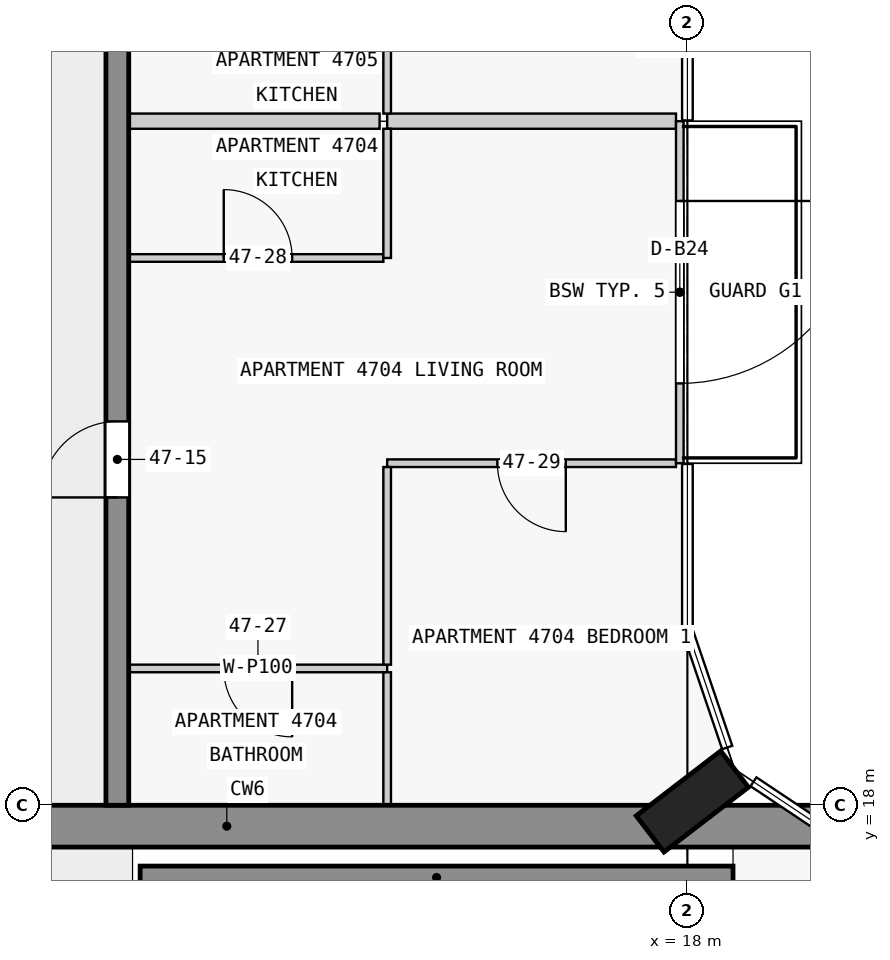
"""IFC4 building model, lengths in metres.
Left out: names, types, materials, properties, quantities, classifications, styles, units other than length and angle.
Written with IfcOpenShell. Run it as: python <this file> out.ifc"""

import sys

from ifc_helpers import new_model, si_unit, direction, frame, frame_2d, origin, origin_2d, place, context, subcontext, project, spatial, rectangle, extrude, element, fill, save


model = new_model("IFC4")
c1 = context("Model", 3, precision=1e-05, world=origin(), true_north=direction((0.0, 1.0)))
c2 = subcontext(c1, "Body", "Model", "MODEL_VIEW")
j1 = project(units=[si_unit("LENGTHUNIT", "METRE"), si_unit("PLANEANGLEUNIT", "RADIAN")], contexts=[c1])
p1 = place(None, origin())
s1 = spatial("IfcSite", under=j1, at=p1, CompositionType="ELEMENT")
p2 = place(p1, origin())
s2 = spatial("IfcBuilding", under=s1, at=p2, CompositionType="ELEMENT")
p3 = place(p2, frame((0.0, 0.0, 181.4)))
s3 = spatial("IfcBuildingStorey", under=s2, at=p3, CompositionType="ELEMENT", Elevation=181.4)
p4 = place(p3, frame((18.065, 18.05, 0.0), z_axis=(0.0, 0.0, 1.0), x_axis=(-0.608810846443, 0.793315418515, 0.0)))
e1 = element("IfcColumn", 1, at=p4, inside=s3, PredefinedType="COLUMN", context=c2, shape_type="SweptSolid", body=[
    extrude(rectangle(XDim=0.6, YDim=1.4, at=origin_2d()), origin(), (0.0, 0.0, 1.0), 3.5),
])
p5 = place(p3, frame((1.38, 17.725, 0.0), z_axis=(0.0, 0.0, 1.0), x_axis=(1.0, 0.0, 0.0)))
e2 = element("IfcWall", 2, at=p5, inside=s3, PredefinedType="SHEAR", context=c2, shape_type="SweptSolid", body=[
    extrude(rectangle(XDim=21.12, YDim=0.55, at=frame_2d((10.56, 0.0))), origin(), (0.0, 0.0, 1.0), 3.2),
])
p6 = place(p5, frame((6.35, 0.0, 0.0)))
e3 = element("IfcOpeningElement", 3, at=p6, cuts=e2, PredefinedType="OPENING", context=c2, shape_type="SweptSolid", body=[
    extrude(rectangle(XDim=1.8, YDim=2.1, at=frame_2d((0.9, 1.05))), frame((0.0, 0.285, 0.0), z_axis=(0.0, -1.0, 0.0), x_axis=(1.0, 0.0, 0.0)), (0.0, 0.0, 1.0), 0.57),
])
p7 = place(p3, frame((10.8, 17.05, 0.0), z_axis=(0.0, 0.0, 1.0), x_axis=(1.0, 0.0, 0.0)))
e4 = element("IfcWall", 4, at=p7, inside=s3, PredefinedType="SHEAR", context=c2, shape_type="SweptSolid", body=[
    extrude(rectangle(XDim=7.8, YDim=0.3, at=frame_2d((3.9, 0.0))), origin(), (0.0, 0.0, 1.0), 3.2),
])
p8 = place(p3, frame((10.5, 18.0, 0.0), z_axis=(0.0, 0.0, 1.0), x_axis=(0.0, 1.0, 0.0)))
e5 = element("IfcWall", 5, at=p8, inside=s3, PredefinedType="SHEAR", context=c2, shape_type="SweptSolid", body=[
    extrude(rectangle(XDim=27.0, YDim=0.3, at=frame_2d((13.5, 0.0))), origin(), (0.0, 0.0, 1.0), 3.2),
])
p9 = place(p8, frame((4.05, 0.0, 0.0)))
e6 = element("IfcOpeningElement", 6, at=p9, cuts=e5, PredefinedType="OPENING", context=c2, shape_type="SweptSolid", body=[
    extrude(rectangle(XDim=1.0, YDim=2.1, at=frame_2d((0.5, 1.05))), frame((0.0, 0.16, 0.0), z_axis=(0.0, -1.0, 0.0), x_axis=(1.0, 0.0, 0.0)), (0.0, 0.0, 1.0), 0.32),
])
p10 = place(p8, frame((13.05, 0.0, 0.0)))
e7 = element("IfcOpeningElement", 7, at=p10, cuts=e5, PredefinedType="OPENING", context=c2, shape_type="SweptSolid", body=[
    extrude(rectangle(XDim=1.0, YDim=2.1, at=frame_2d((0.5, 1.05))), frame((0.0, 0.16, 0.0), z_axis=(0.0, -1.0, 0.0), x_axis=(1.0, 0.0, 0.0)), (0.0, 0.0, 1.0), 0.32),
])
p11 = place(p8, frame((21.35, 0.0, 0.0)))
e8 = element("IfcOpeningElement", 8, at=p11, cuts=e5, PredefinedType="OPENING", context=c2, shape_type="SweptSolid", body=[
    extrude(rectangle(XDim=1.0, YDim=2.1, at=frame_2d((0.5, 1.05))), frame((0.0, 0.16, 0.0), z_axis=(0.0, -1.0, 0.0), x_axis=(1.0, 0.0, 0.0)), (0.0, 0.0, 1.0), 0.32),
])
p12 = place(p3, frame((17.9, 27.0, 0.0), z_axis=(0.0, 0.0, 1.0), x_axis=(0.0, -1.0, 0.0)))
e9 = element("IfcWall", 9, at=p12, inside=s3, PredefinedType="STANDARD", context=c2, shape_type="SweptSolid", body=[
    extrude(rectangle(XDim=4.5, YDim=0.1, at=frame_2d((2.25, 0.0))), origin(), (0.0, 0.0, 1.0), 3.2),
])
p13 = place(p12, frame((1.05, 0.0, 0.0)))
e10 = element("IfcOpeningElement", 10, at=p13, cuts=e9, PredefinedType="OPENING", context=c2, shape_type="SweptSolid", body=[
    extrude(rectangle(XDim=2.4, YDim=2.4, at=frame_2d((1.2, 1.2))), frame((0.0, 0.06, 0.0), z_axis=(0.0, -1.0, 0.0), x_axis=(1.0, 0.0, 0.0)), (0.0, 0.0, 1.0), 0.12),
])
p14 = place(p3, frame((14.05, 19.8, 0.0), z_axis=(0.0, 0.0, 1.0), x_axis=(-1.0, 0.0, 0.0)))
e11 = element("IfcWall", 11, at=p14, inside=s3, PredefinedType="PARTITIONING", context=c2, shape_type="SweptSolid", body=[
    extrude(rectangle(XDim=3.4, YDim=0.1, at=frame_2d((1.7, 0.0))), origin(), (0.0, 0.0, 1.0), 3.2),
])
p15 = place(p14, frame((1.25, 0.0, 0.0)))
e12 = element("IfcOpeningElement", 12, at=p15, cuts=e11, PredefinedType="OPENING", context=c2, shape_type="SweptSolid", body=[
    extrude(rectangle(XDim=0.9, YDim=2.1, at=frame_2d((0.45, 1.05))), frame((0.0, 0.06, 0.0), z_axis=(0.0, -1.0, 0.0), x_axis=(1.0, 0.0, 0.0)), (0.0, 0.0, 1.0), 0.12),
])
p16 = place(p3, frame((17.85, 22.5, 0.0), z_axis=(0.0, 0.0, 1.0), x_axis=(-1.0, 0.0, 0.0)))
e13 = element("IfcWall", 13, at=p16, inside=s3, PredefinedType="PARTITIONING", context=c2, shape_type="SweptSolid", body=[
    extrude(rectangle(XDim=3.8, YDim=0.1, at=frame_2d((1.9, 0.0))), origin(), (0.0, 0.0, 1.0), 3.2),
])
p17 = place(p16, frame((1.45, 0.0, 0.0)))
e14 = element("IfcOpeningElement", 14, at=p17, cuts=e13, PredefinedType="OPENING", context=c2, shape_type="SweptSolid", body=[
    extrude(rectangle(XDim=0.9, YDim=2.1, at=frame_2d((0.45, 1.05))), frame((0.0, 0.06, 0.0), z_axis=(0.0, -1.0, 0.0), x_axis=(1.0, 0.0, 0.0)), (0.0, 0.0, 1.0), 0.12),
])
p18 = place(p3, frame((10.65, 25.2, 0.0), z_axis=(0.0, 0.0, 1.0), x_axis=(1.0, 0.0, 0.0)))
e15 = element("IfcWall", 15, at=p18, inside=s3, PredefinedType="PARTITIONING", context=c2, shape_type="SweptSolid", body=[
    extrude(rectangle(XDim=3.35, YDim=0.1, at=frame_2d((1.675, 0.0))), origin(), (0.0, 0.0, 1.0), 3.2),
])
p19 = place(p18, frame((1.25, 0.0, 0.0)))
e16 = element("IfcOpeningElement", 16, at=p19, cuts=e15, PredefinedType="OPENING", context=c2, shape_type="SweptSolid", body=[
    extrude(rectangle(XDim=0.9, YDim=2.1, at=frame_2d((0.45, 1.05))), frame((0.0, 0.06, 0.0), z_axis=(0.0, -1.0, 0.0), x_axis=(1.0, 0.0, 0.0)), (0.0, 0.0, 1.0), 0.12),
])
p20 = place(p3, frame((13.95, 27.0, 0.0), z_axis=(0.0, 0.0, 1.0), x_axis=(-1.0, 0.0, 0.0)))
e17 = element("IfcWall", 17, at=p20, inside=s3, PredefinedType="PARTITIONING", context=c2, shape_type="SweptSolid", body=[
    extrude(rectangle(XDim=3.3, YDim=0.2, at=frame_2d((1.65, 0.0))), origin(), (0.0, 0.0, 1.0), 3.2),
])
p21 = place(p3, frame((14.05, 27.0, 0.0), z_axis=(0.0, 0.0, 1.0), x_axis=(1.0, 0.0, 0.0)))
e18 = element("IfcWall", 18, at=p21, inside=s3, PredefinedType="PARTITIONING", context=c2, shape_type="SweptSolid", body=[
    extrude(rectangle(XDim=3.8, YDim=0.2, at=frame_2d((1.9, 0.0))), origin(), (0.0, 0.0, 1.0), 3.2),
])
p22 = place(p3, frame((14.05, 22.45, 0.0), z_axis=(0.0, 0.0, 1.0), x_axis=(0.0, -1.0, 0.0)))
e19 = element("IfcWall", 19, at=p22, inside=s3, PredefinedType="PARTITIONING", context=c2, shape_type="SweptSolid", body=[
    extrude(rectangle(XDim=2.6, YDim=0.1, at=frame_2d((1.3, 0.0))), origin(), (0.0, 0.0, 1.0), 3.2),
])
p23 = place(p3, frame((14.05, 18.0, 0.0), z_axis=(0.0, 0.0, 1.0), x_axis=(0.0, 1.0, 0.0)))
e20 = element("IfcWall", 20, at=p23, inside=s3, PredefinedType="PARTITIONING", context=c2, shape_type="SweptSolid", body=[
    extrude(rectangle(XDim=1.75, YDim=0.1, at=frame_2d((0.875, 0.0))), origin(), (0.0, 0.0, 1.0), 3.2),
])
for number, where, z_axis, x_axis in (
    (21, (14.05, 25.2, 0.0), (0.0, 0.0, 1.0), (0.0, 1.0, 0.0)),
    (22, (14.05, 27.1, 0.0), (0.0, 0.0, 1.0), (0.0, 1.0, 0.0)),
):
    element("IfcWall", number, at=place(p3, frame(where, z_axis=z_axis, x_axis=x_axis)), inside=s3, PredefinedType="PARTITIONING", context=c2, shape_type="SweptSolid", body=[
        extrude(rectangle(XDim=1.7, YDim=0.1, at=frame_2d((0.85, 0.0))), origin(), (0.0, 0.0, 1.0), 3.2),
    ])
p24 = place(p13, origin())
e23 = element("IfcDoor", 23, at=p24, inside=s3, OperationType="SINGLE_SWING_LEFT", PredefinedType="DOOR", context=c2, shape_type="SweptSolid", body=[
    extrude(rectangle(XDim=2.4, YDim=2.4, at=frame_2d((1.2, 1.2))), frame((0.0, 0.025, 0.0), z_axis=(0.0, -1.0, 0.0), x_axis=(1.0, 0.0, 0.0)), (0.0, 0.0, 1.0), 0.05),
])
fill(e10, e23)
p25 = place(p9, origin())
e24 = element("IfcDoor", 24, at=p25, inside=s3, OperationType="SINGLE_SWING_LEFT", PredefinedType="DOOR", context=c2, shape_type="SweptSolid", body=[
    extrude(rectangle(XDim=1.0, YDim=2.1, at=frame_2d((0.5, 1.05))), frame((0.0, 0.025, 0.0), z_axis=(0.0, -1.0, 0.0), x_axis=(1.0, 0.0, 0.0)), (0.0, 0.0, 1.0), 0.05),
])
fill(e6, e24)
p26 = place(p15, origin())
e25 = element("IfcDoor", 25, at=p26, inside=s3, OperationType="SINGLE_SWING_LEFT", PredefinedType="DOOR", context=c2, shape_type="SweptSolid", body=[
    extrude(rectangle(XDim=0.9, YDim=2.1, at=frame_2d((0.45, 1.05))), frame((0.0, 0.025, 0.0), z_axis=(0.0, -1.0, 0.0), x_axis=(1.0, 0.0, 0.0)), (0.0, 0.0, 1.0), 0.05),
])
fill(e12, e25)
p27 = place(p19, origin())
e26 = element("IfcDoor", 26, at=p27, inside=s3, OperationType="SINGLE_SWING_RIGHT", PredefinedType="DOOR", context=c2, shape_type="SweptSolid", body=[
    extrude(rectangle(XDim=0.9, YDim=2.1, at=frame_2d((0.45, 1.05))), frame((0.0, 0.025, 0.0), z_axis=(0.0, -1.0, 0.0), x_axis=(1.0, 0.0, 0.0)), (0.0, 0.0, 1.0), 0.05),
])
fill(e16, e26)
p28 = place(p17, origin())
e27 = element("IfcDoor", 27, at=p28, inside=s3, OperationType="SINGLE_SWING_LEFT", PredefinedType="DOOR", context=c2, shape_type="SweptSolid", body=[
    extrude(rectangle(XDim=0.9, YDim=2.1, at=frame_2d((0.45, 1.05))), frame((0.0, 0.025, 0.0), z_axis=(0.0, -1.0, 0.0), x_axis=(1.0, 0.0, 0.0)), (0.0, 0.0, 1.0), 0.05),
])
fill(e14, e27)
save(model, sys.argv[1])
